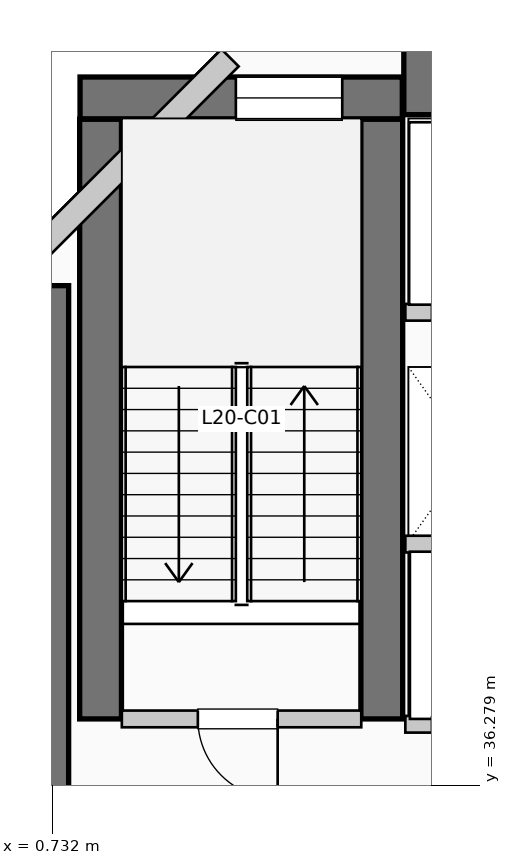
"""IFC4 building model, lengths in metres.
Left out: names, types, materials, properties, quantities, classifications, styles, units other than length and angle.
Written with IfcOpenShell. Run it as: python <this file> out.ifc"""

import sys

from ifc_helpers import new_model, si_unit, direction, frame, frame_2d, origin, place, context, subcontext, project, spatial, rectangle, extrude, element, fill, save


model = new_model("IFC4")
c1 = context("Model", 3, precision=1e-05, world=origin(), true_north=direction((0.0, 1.0)))
c2 = subcontext(c1, "Body", "Model", "MODEL_VIEW")
j1 = project(units=[si_unit("LENGTHUNIT", "METRE"), si_unit("PLANEANGLEUNIT", "RADIAN")], contexts=[c1])
p1 = place(None, origin())
s1 = spatial("IfcSite", under=j1, at=p1, CompositionType="ELEMENT")
p2 = place(p1, origin())
s2 = spatial("IfcBuilding", under=s1, at=p2, CompositionType="ELEMENT")
p3 = place(p2, frame((0.0, 0.0, 85.8)))
s3 = spatial("IfcBuildingStorey", under=s2, at=p3, CompositionType="ELEMENT", Elevation=85.8)
p4 = place(p3, frame((5.36, 45.55, 0.0), z_axis=(0.0, 0.0, 1.0), x_axis=(1.0, 0.0, 0.0)))
e1 = element("IfcWall", 1, at=p4, inside=s3, PredefinedType="SHEAR", context=c2, shape_type="SweptSolid", body=[
    extrude(rectangle(XDim=13.98, YDim=0.9, at=frame_2d((6.99, 0.0))), origin(), (0.0, 0.0, 1.0), 3.96),
])
p5 = place(p3, frame((0.5, 34.95, 0.0), z_axis=(0.0, 0.0, 1.0), x_axis=(0.0, 1.0, 0.0)))
e2 = element("IfcWall", 2, at=p5, inside=s3, PredefinedType="SHEAR", context=c2, shape_type="SweptSolid", body=[
    extrude(rectangle(XDim=7.9, YDim=0.9, at=frame_2d((3.95, 0.0))), origin(), (0.0, 0.0, 1.0), 3.96),
])
for number, where, z_axis, x_axis in (
    (3, (1.37, 37.15, 0.0), (0.0, 0.0, 1.0), (0.0, 1.0, 0.0)),
    (4, (5.07, 37.15, 0.0), (0.0, 0.0, 1.0), (0.0, 1.0, 0.0)),
):
    element("IfcWall", number, at=place(p3, frame(where, z_axis=z_axis, x_axis=x_axis)), inside=s3, PredefinedType="SHEAR", context=c2, shape_type="SweptSolid", body=[
        extrude(rectangle(XDim=7.89, YDim=0.55, at=frame_2d((3.945, 0.0))), origin(), (0.0, 0.0, 1.0), 3.96),
    ])
p6 = place(p3, frame((1.1, 45.32, 0.0), z_axis=(0.0, 0.0, 1.0), x_axis=(1.0, 0.0, 0.0)))
e5 = element("IfcWall", 5, at=p6, inside=s3, PredefinedType="SHEAR", context=c2, shape_type="SweptSolid", body=[
    extrude(rectangle(XDim=4.24, YDim=0.55, at=frame_2d((2.12, 0.0))), origin(), (0.0, 0.0, 1.0), 3.96),
])
p7 = place(p6, frame((2.05, 0.0, 1.05)))
e6 = element("IfcOpeningElement", 6, at=p7, cuts=e5, PredefinedType="OPENING", context=c2, shape_type="SweptSolid", body=[
    extrude(rectangle(XDim=1.4, YDim=1.8, at=frame_2d((0.7, 0.9))), frame((0.0, 0.285, 0.0), z_axis=(0.0, -1.0, 0.0), x_axis=(1.0, 0.0, 0.0)), (0.0, 0.0, 1.0), 0.57),
])
p8 = place(p3, frame((3.074, 45.848, 0.0), z_axis=(0.0, 0.0, 1.0), x_axis=(-0.707106781187, -0.707106781187, 0.0)))
e7 = element("IfcWall", 7, at=p8, inside=s3, PredefinedType="SOLIDWALL", context=c2, shape_type="SweptSolid", body=[
    extrude(rectangle(XDim=4.133, YDim=0.32, at=frame_2d((2.066, 0.0))), origin(), (0.0, 0.0, 1.0), 3.71),
])
p9 = place(p3, frame((1.65, 37.15, 0.0), z_axis=(0.0, 0.0, 1.0), x_axis=(1.0, 0.0, 0.0)))
e8 = element("IfcWall", 8, at=p9, inside=s3, PredefinedType="PARTITIONING", context=c2, shape_type="SweptSolid", body=[
    extrude(rectangle(XDim=3.15, YDim=0.22, at=frame_2d((1.575, 0.0))), origin(), (0.0, 0.0, 1.0), 3.71),
])
p10 = place(p9, frame((2.05, 0.0, 0.0), z_axis=(0.0, 0.0, 1.0), x_axis=(-1.0, 0.0, 0.0)))
e9 = element("IfcOpeningElement", 9, at=p10, cuts=e8, PredefinedType="OPENING", context=c2, shape_type="SweptSolid", body=[
    extrude(rectangle(XDim=1.05, YDim=2.15, at=frame_2d((0.525, 1.075))), frame((0.0, 0.12, 0.0), z_axis=(0.0, -1.0, 0.0), x_axis=(1.0, 0.0, 0.0)), (0.0, 0.0, 1.0), 0.24),
])
p11 = place(p3, frame((5.38, 37.08, 0.0), z_axis=(0.0, 0.0, 1.0), x_axis=(1.0, 0.0, 0.0)))
e10 = element("IfcWall", 10, at=p11, inside=s3, PredefinedType="PARTITIONING", context=c2, shape_type="SweptSolid", body=[
    extrude(rectangle(XDim=3.46, YDim=0.22, at=frame_2d((1.73, 0.0))), origin(), (0.0, 0.0, 1.0), 3.71),
])
p12 = place(p11, frame((1.55, 0.0, 0.0), z_axis=(0.0, 0.0, 1.0), x_axis=(-1.0, 0.0, 0.0)))
e11 = element("IfcOpeningElement", 11, at=p12, cuts=e10, PredefinedType="OPENING", context=c2, shape_type="SweptSolid", body=[
    extrude(rectangle(XDim=1.2, YDim=2.2, at=frame_2d((0.6, 1.1))), frame((0.0, 0.12, 0.0), z_axis=(0.0, -1.0, 0.0), x_axis=(1.0, 0.0, 0.0)), (0.0, 0.0, 1.0), 0.24),
])
p13 = place(p11, frame((3.22, 0.0, 0.0), z_axis=(0.0, 0.0, 1.0), x_axis=(-1.0, 0.0, 0.0)))
e12 = element("IfcOpeningElement", 12, at=p13, cuts=e10, PredefinedType="OPENING", context=c2, shape_type="SweptSolid", body=[
    extrude(rectangle(XDim=1.2, YDim=2.2, at=frame_2d((0.6, 1.1))), frame((0.0, 0.12, 0.0), z_axis=(0.0, -1.0, 0.0), x_axis=(1.0, 0.0, 0.0)), (0.0, 0.0, 1.0), 0.24),
])
p14 = place(p3, frame((5.38, 39.45, 0.0), z_axis=(0.0, 0.0, 1.0), x_axis=(1.0, 0.0, 0.0)))
e13 = element("IfcWall", 13, at=p14, inside=s3, PredefinedType="PARTITIONING", context=c2, shape_type="SweptSolid", body=[
    extrude(rectangle(XDim=3.46, YDim=0.22, at=frame_2d((1.73, 0.0))), origin(), (0.0, 0.0, 1.0), 3.71),
])
p15 = place(p3, frame((5.38, 42.5, 0.0), z_axis=(0.0, 0.0, 1.0), x_axis=(1.0, 0.0, 0.0)))
e14 = element("IfcWall", 14, at=p15, inside=s3, PredefinedType="PARTITIONING", context=c2, shape_type="SweptSolid", body=[
    extrude(rectangle(XDim=3.77, YDim=0.22, at=frame_2d((1.885, 0.0))), origin(), (0.0, 0.0, 1.0), 3.71),
])
p16 = place(p15, frame((1.75, 0.0, 0.0), z_axis=(0.0, 0.0, 1.0), x_axis=(-1.0, 0.0, 0.0)))
e15 = element("IfcOpeningElement", 15, at=p16, cuts=e14, PredefinedType="OPENING", context=c2, shape_type="SweptSolid", body=[
    extrude(rectangle(XDim=1.4, YDim=2.2, at=frame_2d((0.7, 1.1))), frame((0.0, 0.12, 0.0), z_axis=(0.0, -1.0, 0.0), x_axis=(1.0, 0.0, 0.0)), (0.0, 0.0, 1.0), 0.24),
])
p17 = place(p15, frame((3.53, 0.0, 0.0), z_axis=(0.0, 0.0, 1.0), x_axis=(-1.0, 0.0, 0.0)))
e16 = element("IfcOpeningElement", 16, at=p17, cuts=e14, PredefinedType="OPENING", context=c2, shape_type="SweptSolid", body=[
    extrude(rectangle(XDim=1.4, YDim=2.2, at=frame_2d((0.7, 1.1))), frame((0.0, 0.12, 0.0), z_axis=(0.0, -1.0, 0.0), x_axis=(1.0, 0.0, 0.0)), (0.0, 0.0, 1.0), 0.24),
])
p18 = place(p7, origin())
e17 = element("IfcWindow", 17, at=p18, inside=s3, PartitioningType="SINGLE_PANEL", PredefinedType="WINDOW", context=c2, shape_type="SweptSolid", body=[
    extrude(rectangle(XDim=1.4, YDim=1.8, at=frame_2d((0.7, 0.9))), frame((0.0, 0.03, 0.0), z_axis=(0.0, -1.0, 0.0), x_axis=(1.0, 0.0, 0.0)), (0.0, 0.0, 1.0), 0.06),
])
fill(e6, e17)
p19 = place(p10, origin())
e18 = element("IfcDoor", 18, at=p19, inside=s3, OperationType="SINGLE_SWING_RIGHT", PredefinedType="DOOR", context=c2, shape_type="SweptSolid", body=[
    extrude(rectangle(XDim=1.05, YDim=2.15, at=frame_2d((0.525, 1.075))), frame((0.0, 0.025, 0.0), z_axis=(0.0, -1.0, 0.0), x_axis=(1.0, 0.0, 0.0)), (0.0, 0.0, 1.0), 0.05),
])
fill(e9, e18)
save(model, sys.argv[1])
